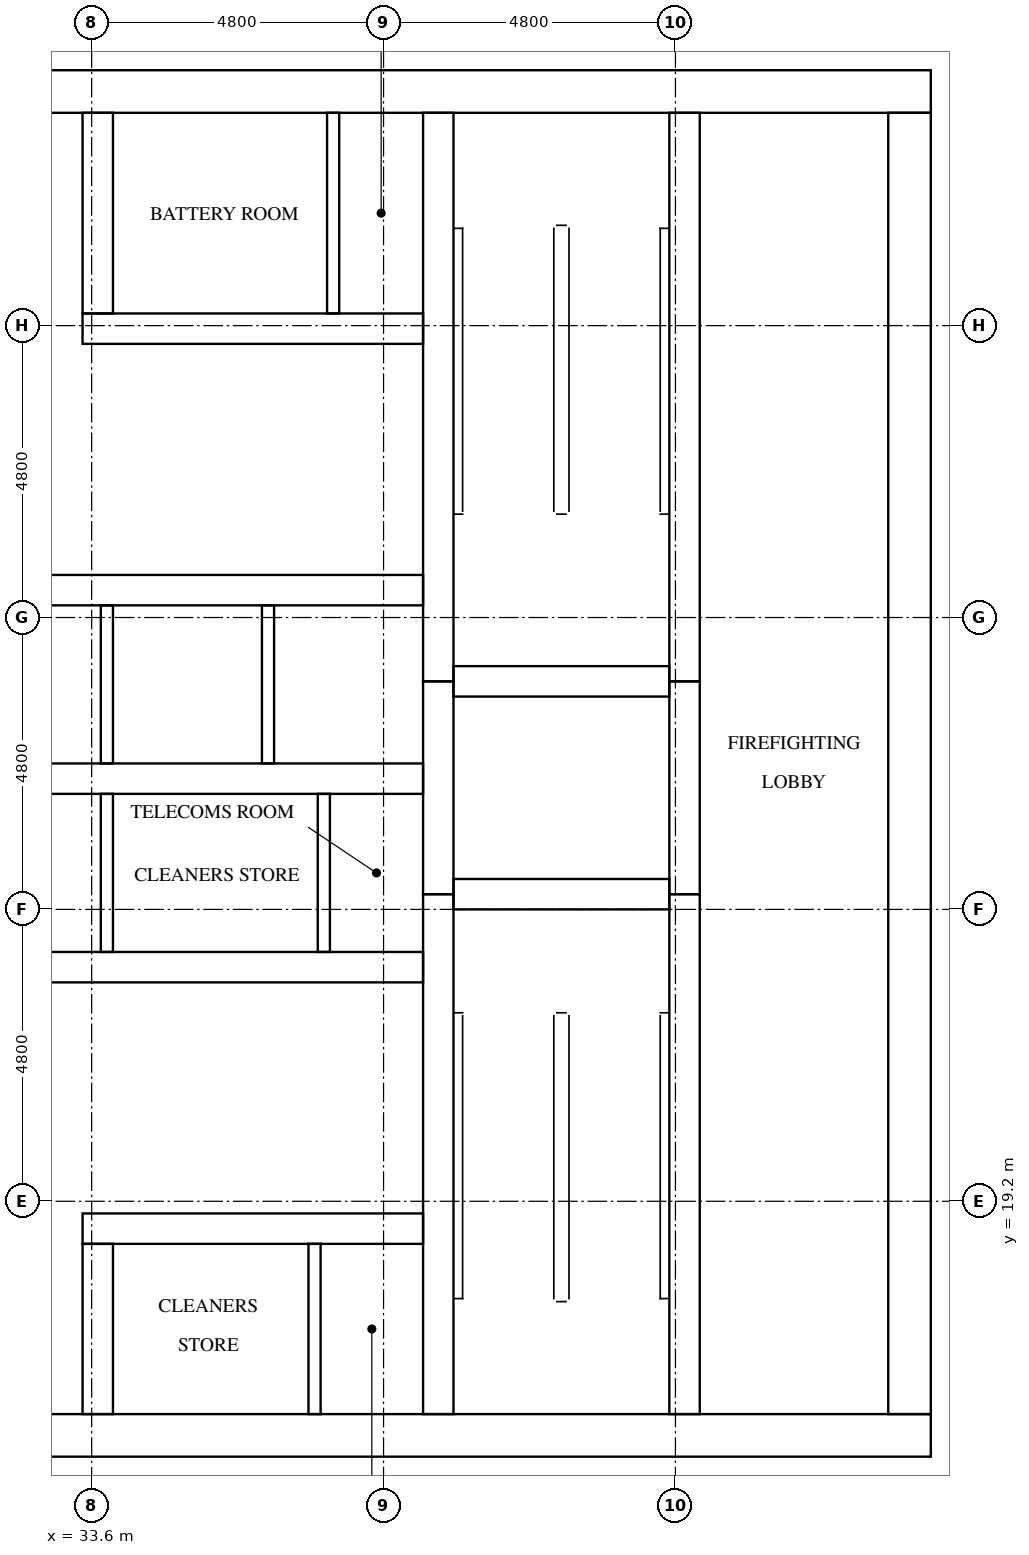
"""IFC4 building model, lengths in metres.
Left out: names, types, materials, properties, quantities, classifications, styles, units other than length and angle.
Written with IfcOpenShell. Run it as: python <this file> out.ifc"""

import sys

from ifc_helpers import new_model, si_unit, direction, frame, frame_2d, origin, place, context, subcontext, project, spatial, rectangle, extrude, element, fill, save


model = new_model("IFC4")
c1 = context("Model", 3, precision=1e-05, world=origin(), true_north=direction((0.0, 1.0)))
c2 = subcontext(c1, "Body", "Model", "MODEL_VIEW")
j1 = project(units=[si_unit("LENGTHUNIT", "METRE"), si_unit("PLANEANGLEUNIT", "RADIAN")], contexts=[c1])
p1 = place(None, origin())
s1 = spatial("IfcSite", under=j1, at=p1, CompositionType="ELEMENT")
p2 = place(p1, origin())
s2 = spatial("IfcBuilding", under=s1, at=p2, CompositionType="ELEMENT")
p3 = place(p2, frame((0.0, 0.0, 203.4)))
s3 = spatial("IfcBuildingStorey", under=s2, at=p3, CompositionType="ELEMENT", Elevation=203.4)
p4 = place(p3, frame((15.0, 15.35, 0.0), z_axis=(0.0, 0.0, 1.0), x_axis=(1.0, 0.0, 0.0)))
e1 = element("IfcWall", 1, at=p4, inside=s3, PredefinedType="SHEAR", context=c2, shape_type="SweptSolid", body=[
    extrude(rectangle(XDim=32.4, YDim=0.7, at=frame_2d((16.2, 0.0))), origin(), (0.0, 0.0, 1.0), 5.1),
])
p5 = place(p4, frame((15.3, 0.0, 0.0)))
e2 = element("IfcOpeningElement", 2, at=p5, cuts=e1, PredefinedType="OPENING", context=c2, shape_type="SweptSolid", body=[
    extrude(rectangle(XDim=1.8, YDim=2.1, at=frame_2d((0.9, 1.05))), frame((0.0, 0.36, 0.0), z_axis=(0.0, -1.0, 0.0), x_axis=(1.0, 0.0, 0.0)), (0.0, 0.0, 1.0), 0.72),
])
p6 = place(p3, frame((15.0, 37.45, 0.0), z_axis=(0.0, 0.0, 1.0), x_axis=(1.0, 0.0, 0.0)))
e3 = element("IfcWall", 3, at=p6, inside=s3, PredefinedType="SHEAR", context=c2, shape_type="SweptSolid", body=[
    extrude(rectangle(XDim=32.4, YDim=0.7, at=frame_2d((16.2, 0.0))), origin(), (0.0, 0.0, 1.0), 5.1),
])
p7 = place(p6, frame((15.3, 0.0, 0.0)))
e4 = element("IfcOpeningElement", 4, at=p7, cuts=e3, PredefinedType="OPENING", context=c2, shape_type="SweptSolid", body=[
    extrude(rectangle(XDim=1.8, YDim=2.1, at=frame_2d((0.9, 1.05))), frame((0.0, 0.36, 0.0), z_axis=(0.0, -1.0, 0.0), x_axis=(1.0, 0.0, 0.0)), (0.0, 0.0, 1.0), 0.72),
])
p8 = place(p6, frame((1.544, 0.0, 0.0)))
e5 = element("IfcOpeningElement", 5, at=p8, cuts=e3, PredefinedType="OPENING", context=c2, shape_type="SweptSolid", body=[
    extrude(rectangle(XDim=1.0, YDim=2.1, at=frame_2d((0.5, 1.05))), frame((0.0, 0.36, 0.0), z_axis=(0.0, -1.0, 0.0), x_axis=(1.0, 0.0, 0.0)), (0.0, 0.0, 1.0), 0.72),
])
p9 = place(p6, frame((5.219, 0.0, 0.0)))
e6 = element("IfcOpeningElement", 6, at=p9, cuts=e3, PredefinedType="OPENING", context=c2, shape_type="SweptSolid", body=[
    extrude(rectangle(XDim=1.0, YDim=2.1, at=frame_2d((0.5, 1.05))), frame((0.0, 0.36, 0.0), z_axis=(0.0, -1.0, 0.0), x_axis=(1.0, 0.0, 0.0)), (0.0, 0.0, 1.0), 0.72),
])
p10 = place(p3, frame((47.05, 15.7, 0.0), z_axis=(0.0, 0.0, 1.0), x_axis=(0.0, 1.0, 0.0)))
e7 = element("IfcWall", 7, at=p10, inside=s3, PredefinedType="SHEAR", context=c2, shape_type="SweptSolid", body=[
    extrude(rectangle(XDim=21.4, YDim=0.7, at=frame_2d((10.7, 0.0))), origin(), (0.0, 0.0, 1.0), 5.1),
])
p11 = place(p10, frame((10.4, 0.0, 0.0)))
e8 = element("IfcOpeningElement", 8, at=p11, cuts=e7, PredefinedType="OPENING", context=c2, shape_type="SweptSolid", body=[
    extrude(rectangle(XDim=1.2, YDim=2.1, at=frame_2d((0.6, 1.05))), frame((0.0, 0.36, 0.0), z_axis=(0.0, -1.0, 0.0), x_axis=(1.0, 0.0, 0.0)), (0.0, 0.0, 1.0), 0.72),
])
p12 = place(p3, frame((39.3, 15.7, 0.0), z_axis=(0.0, 0.0, 1.0), x_axis=(0.0, 1.0, 0.0)))
e9 = element("IfcWall", 9, at=p12, inside=s3, PredefinedType="SHEAR", context=c2, shape_type="SweptSolid", body=[
    extrude(rectangle(XDim=8.55, YDim=0.5, at=frame_2d((4.275, 0.0))), origin(), (0.0, 0.0, 1.0), 5.1),
])
p13 = place(p3, frame((39.3, 24.25, 0.0), z_axis=(0.0, 0.0, 1.0), x_axis=(0.0, 1.0, 0.0)))
e10 = element("IfcWall", 10, at=p13, inside=s3, PredefinedType="SHEAR", context=c2, shape_type="SweptSolid", body=[
    extrude(rectangle(XDim=3.5, YDim=0.5, at=frame_2d((1.75, 0.0))), origin(), (0.0, 0.0, 1.0), 5.1),
])
p14 = place(p3, frame((39.3, 27.75, 0.0), z_axis=(0.0, 0.0, 1.0), x_axis=(0.0, 1.0, 0.0)))
e11 = element("IfcWall", 11, at=p14, inside=s3, PredefinedType="SHEAR", context=c2, shape_type="SweptSolid", body=[
    extrude(rectangle(XDim=9.35, YDim=0.5, at=frame_2d((4.675, 0.0))), origin(), (0.0, 0.0, 1.0), 5.1),
])
p15 = place(p3, frame((43.35, 15.7, 0.0), z_axis=(0.0, 0.0, 1.0), x_axis=(0.0, 1.0, 0.0)))
e12 = element("IfcWall", 12, at=p15, inside=s3, PredefinedType="SHEAR", context=c2, shape_type="SweptSolid", body=[
    extrude(rectangle(XDim=8.55, YDim=0.5, at=frame_2d((4.275, 0.0))), origin(), (0.0, 0.0, 1.0), 5.1),
])
p16 = place(p15, frame((0.5, 0.0, 0.0)))
e13 = element("IfcOpeningElement", 13, at=p16, cuts=e12, PredefinedType="OPENING", context=c2, shape_type="SweptSolid", body=[
    extrude(rectangle(XDim=1.2, YDim=2.1, at=frame_2d((0.6, 1.05))), frame((0.0, 0.26, 0.0), z_axis=(0.0, -1.0, 0.0), x_axis=(1.0, 0.0, 0.0)), (0.0, 0.0, 1.0), 0.52),
])
p17 = place(p3, frame((43.35, 24.25, 0.0), z_axis=(0.0, 0.0, 1.0), x_axis=(0.0, 1.0, 0.0)))
e14 = element("IfcWall", 14, at=p17, inside=s3, PredefinedType="SHEAR", context=c2, shape_type="SweptSolid", body=[
    extrude(rectangle(XDim=3.5, YDim=0.5, at=frame_2d((1.75, 0.0))), origin(), (0.0, 0.0, 1.0), 5.1),
])
p18 = place(p17, frame((1.2, 0.0, 0.0)))
e15 = element("IfcOpeningElement", 15, at=p18, cuts=e14, PredefinedType="OPENING", context=c2, shape_type="SweptSolid", body=[
    extrude(rectangle(XDim=1.1, YDim=2.1, at=frame_2d((0.55, 1.05))), frame((0.0, 0.26, 0.0), z_axis=(0.0, -1.0, 0.0), x_axis=(1.0, 0.0, 0.0)), (0.0, 0.0, 1.0), 0.52),
])
p19 = place(p3, frame((43.35, 27.75, 0.0), z_axis=(0.0, 0.0, 1.0), x_axis=(0.0, 1.0, 0.0)))
e16 = element("IfcWall", 16, at=p19, inside=s3, PredefinedType="SHEAR", context=c2, shape_type="SweptSolid", body=[
    extrude(rectangle(XDim=9.35, YDim=0.5, at=frame_2d((4.675, 0.0))), origin(), (0.0, 0.0, 1.0), 5.1),
])
p20 = place(p19, frame((7.65, 0.0, 0.0)))
e17 = element("IfcOpeningElement", 17, at=p20, cuts=e16, PredefinedType="OPENING", context=c2, shape_type="SweptSolid", body=[
    extrude(rectangle(XDim=1.2, YDim=2.1, at=frame_2d((0.6, 1.05))), frame((0.0, 0.26, 0.0), z_axis=(0.0, -1.0, 0.0), x_axis=(1.0, 0.0, 0.0)), (0.0, 0.0, 1.0), 0.52),
])
for number, where, z_axis, x_axis in (
    (18, (39.55, 24.25, 0.0), (0.0, 0.0, 1.0), (1.0, 0.0, 0.0)),
    (19, (39.55, 27.75, 0.0), (0.0, 0.0, 1.0), (1.0, 0.0, 0.0)),
):
    element("IfcWall", number, at=place(p3, frame(where, z_axis=z_axis, x_axis=x_axis)), inside=s3, PredefinedType="SHEAR", context=c2, shape_type="SweptSolid", body=[
        extrude(rectangle(XDim=3.55, YDim=0.5, at=frame_2d((1.775, 0.0))), origin(), (0.0, 0.0, 1.0), 5.1),
    ])
p21 = place(p3, frame((33.45, 18.75, 0.0), z_axis=(0.0, 0.0, 1.0), x_axis=(1.0, 0.0, 0.0)))
e20 = element("IfcWall", 20, at=p21, inside=s3, PredefinedType="SHEAR", context=c2, shape_type="SweptSolid", body=[
    extrude(rectangle(XDim=5.6, YDim=0.5, at=frame_2d((2.8, 0.0))), origin(), (0.0, 0.0, 1.0), 5.1),
])
p22 = place(p21, frame((1.607, 0.0, 0.0)))
e21 = element("IfcOpeningElement", 21, at=p22, cuts=e20, PredefinedType="OPENING", context=c2, shape_type="SweptSolid", body=[
    extrude(rectangle(XDim=1.0, YDim=2.1, at=frame_2d((0.5, 1.05))), frame((0.0, 0.26, 0.0), z_axis=(0.0, -1.0, 0.0), x_axis=(1.0, 0.0, 0.0)), (0.0, 0.0, 1.0), 0.52),
])
p23 = place(p21, frame((4.258, 0.0, 0.0)))
e22 = element("IfcOpeningElement", 22, at=p23, cuts=e20, PredefinedType="OPENING", context=c2, shape_type="SweptSolid", body=[
    extrude(rectangle(XDim=1.0, YDim=2.1, at=frame_2d((0.5, 1.05))), frame((0.0, 0.26, 0.0), z_axis=(0.0, -1.0, 0.0), x_axis=(1.0, 0.0, 0.0)), (0.0, 0.0, 1.0), 0.52),
])
p24 = place(p3, frame((23.35, 23.05, 0.0), z_axis=(0.0, 0.0, 1.0), x_axis=(1.0, 0.0, 0.0)))
e23 = element("IfcWall", 23, at=p24, inside=s3, PredefinedType="SHEAR", context=c2, shape_type="SweptSolid", body=[
    extrude(rectangle(XDim=15.7, YDim=0.5, at=frame_2d((7.85, 0.0))), origin(), (0.0, 0.0, 1.0), 5.1),
])
p25 = place(p24, frame((2.05, 0.0, 0.0)))
e24 = element("IfcOpeningElement", 24, at=p25, cuts=e23, PredefinedType="OPENING", context=c2, shape_type="SweptSolid", body=[
    extrude(rectangle(XDim=1.0, YDim=2.1, at=frame_2d((0.5, 1.05))), frame((0.0, 0.26, 0.0), z_axis=(0.0, -1.0, 0.0), x_axis=(1.0, 0.0, 0.0)), (0.0, 0.0, 1.0), 0.52),
])
p26 = place(p24, frame((11.784, 0.0, 0.0)))
e25 = element("IfcOpeningElement", 25, at=p26, cuts=e23, PredefinedType="OPENING", context=c2, shape_type="SweptSolid", body=[
    extrude(rectangle(XDim=1.0, YDim=2.1, at=frame_2d((0.5, 1.05))), frame((0.0, 0.26, 0.0), z_axis=(0.0, -1.0, 0.0), x_axis=(1.0, 0.0, 0.0)), (0.0, 0.0, 1.0), 0.52),
])
p27 = place(p24, frame((14.434, 0.0, 0.0)))
e26 = element("IfcOpeningElement", 26, at=p27, cuts=e23, PredefinedType="OPENING", context=c2, shape_type="SweptSolid", body=[
    extrude(rectangle(XDim=1.0, YDim=2.1, at=frame_2d((0.5, 1.05))), frame((0.0, 0.26, 0.0), z_axis=(0.0, -1.0, 0.0), x_axis=(1.0, 0.0, 0.0)), (0.0, 0.0, 1.0), 0.52),
])
p28 = place(p3, frame((23.35, 26.15, 0.0), z_axis=(0.0, 0.0, 1.0), x_axis=(1.0, 0.0, 0.0)))
e27 = element("IfcWall", 27, at=p28, inside=s3, PredefinedType="SHEAR", context=c2, shape_type="SweptSolid", body=[
    extrude(rectangle(XDim=15.7, YDim=0.5, at=frame_2d((7.85, 0.0))), origin(), (0.0, 0.0, 1.0), 5.1),
])
p29 = place(p3, frame((23.35, 29.25, 0.0), z_axis=(0.0, 0.0, 1.0), x_axis=(1.0, 0.0, 0.0)))
e28 = element("IfcWall", 28, at=p29, inside=s3, PredefinedType="SHEAR", context=c2, shape_type="SweptSolid", body=[
    extrude(rectangle(XDim=15.7, YDim=0.5, at=frame_2d((7.85, 0.0))), origin(), (0.0, 0.0, 1.0), 5.1),
])
p30 = place(p29, frame((0.675, 0.0, 0.0)))
e29 = element("IfcOpeningElement", 29, at=p30, cuts=e28, PredefinedType="OPENING", context=c2, shape_type="SweptSolid", body=[
    extrude(rectangle(XDim=1.1, YDim=2.1, at=frame_2d((0.55, 1.05))), frame((0.0, 0.26, 0.0), z_axis=(0.0, -1.0, 0.0), x_axis=(1.0, 0.0, 0.0)), (0.0, 0.0, 1.0), 0.52),
])
p31 = place(p29, frame((3.325, 0.0, 0.0)))
e30 = element("IfcOpeningElement", 30, at=p31, cuts=e28, PredefinedType="OPENING", context=c2, shape_type="SweptSolid", body=[
    extrude(rectangle(XDim=1.1, YDim=2.1, at=frame_2d((0.55, 1.05))), frame((0.0, 0.26, 0.0), z_axis=(0.0, -1.0, 0.0), x_axis=(1.0, 0.0, 0.0)), (0.0, 0.0, 1.0), 0.52),
])
p32 = place(p29, frame((5.975, 0.0, 0.0)))
e31 = element("IfcOpeningElement", 31, at=p32, cuts=e28, PredefinedType="OPENING", context=c2, shape_type="SweptSolid", body=[
    extrude(rectangle(XDim=1.1, YDim=2.1, at=frame_2d((0.55, 1.05))), frame((0.0, 0.26, 0.0), z_axis=(0.0, -1.0, 0.0), x_axis=(1.0, 0.0, 0.0)), (0.0, 0.0, 1.0), 0.52),
])
p33 = place(p29, frame((8.625, 0.0, 0.0)))
e32 = element("IfcOpeningElement", 32, at=p33, cuts=e28, PredefinedType="OPENING", context=c2, shape_type="SweptSolid", body=[
    extrude(rectangle(XDim=1.1, YDim=2.1, at=frame_2d((0.55, 1.05))), frame((0.0, 0.26, 0.0), z_axis=(0.0, -1.0, 0.0), x_axis=(1.0, 0.0, 0.0)), (0.0, 0.0, 1.0), 0.52),
])
p34 = place(p29, frame((11.275, 0.0, 0.0)))
e33 = element("IfcOpeningElement", 33, at=p34, cuts=e28, PredefinedType="OPENING", context=c2, shape_type="SweptSolid", body=[
    extrude(rectangle(XDim=1.1, YDim=2.1, at=frame_2d((0.55, 1.05))), frame((0.0, 0.26, 0.0), z_axis=(0.0, -1.0, 0.0), x_axis=(1.0, 0.0, 0.0)), (0.0, 0.0, 1.0), 0.52),
])
p35 = place(p29, frame((13.925, 0.0, 0.0)))
e34 = element("IfcOpeningElement", 34, at=p35, cuts=e28, PredefinedType="OPENING", context=c2, shape_type="SweptSolid", body=[
    extrude(rectangle(XDim=1.1, YDim=2.1, at=frame_2d((0.55, 1.05))), frame((0.0, 0.26, 0.0), z_axis=(0.0, -1.0, 0.0), x_axis=(1.0, 0.0, 0.0)), (0.0, 0.0, 1.0), 0.52),
])
p36 = place(p3, frame((33.45, 33.55, 0.0), z_axis=(0.0, 0.0, 1.0), x_axis=(1.0, 0.0, 0.0)))
e35 = element("IfcWall", 35, at=p36, inside=s3, PredefinedType="SHEAR", context=c2, shape_type="SweptSolid", body=[
    extrude(rectangle(XDim=5.6, YDim=0.5, at=frame_2d((2.8, 0.0))), origin(), (0.0, 0.0, 1.0), 5.1),
])
p37 = place(p36, frame((1.76, 0.0, 0.0)))
e36 = element("IfcOpeningElement", 36, at=p37, cuts=e35, PredefinedType="OPENING", context=c2, shape_type="SweptSolid", body=[
    extrude(rectangle(XDim=1.0, YDim=2.1, at=frame_2d((0.5, 1.05))), frame((0.0, 0.26, 0.0), z_axis=(0.0, -1.0, 0.0), x_axis=(1.0, 0.0, 0.0)), (0.0, 0.0, 1.0), 0.52),
])
p38 = place(p36, frame((4.41, 0.0, 0.0)))
e37 = element("IfcOpeningElement", 37, at=p38, cuts=e35, PredefinedType="OPENING", context=c2, shape_type="SweptSolid", body=[
    extrude(rectangle(XDim=1.0, YDim=2.1, at=frame_2d((0.5, 1.05))), frame((0.0, 0.26, 0.0), z_axis=(0.0, -1.0, 0.0), x_axis=(1.0, 0.0, 0.0)), (0.0, 0.0, 1.0), 0.52),
])
p39 = place(p3, frame((33.7, 15.7, 0.0), z_axis=(0.0, 0.0, 1.0), x_axis=(0.0, 1.0, 0.0)))
e38 = element("IfcWall", 38, at=p39, inside=s3, PredefinedType="SHEAR", context=c2, shape_type="SweptSolid", body=[
    extrude(rectangle(XDim=2.8, YDim=0.5, at=frame_2d((1.4, 0.0))), origin(), (0.0, 0.0, 1.0), 5.1),
])
p40 = place(p3, frame((33.7, 33.8, 0.0), z_axis=(0.0, 0.0, 1.0), x_axis=(0.0, 1.0, 0.0)))
e39 = element("IfcWall", 39, at=p40, inside=s3, PredefinedType="SHEAR", context=c2, shape_type="SweptSolid", body=[
    extrude(rectangle(XDim=3.3, YDim=0.5, at=frame_2d((1.65, 0.0))), origin(), (0.0, 0.0, 1.0), 5.1),
])
p41 = place(p3, frame((33.85, 23.3, 0.0), z_axis=(0.0, 0.0, 1.0), x_axis=(0.0, 1.0, 0.0)))
e40 = element("IfcWall", 40, at=p41, inside=s3, PredefinedType="SOLIDWALL", context=c2, shape_type="SweptSolid", body=[
    extrude(rectangle(XDim=2.6, YDim=0.2, at=frame_2d((1.3, 0.0))), origin(), (0.0, 0.0, 1.0), 5.1),
])
for number, where, z_axis, x_axis in (
    (41, (33.85, 26.4, 0.0), (0.0, 0.0, 1.0), (0.0, 1.0, 0.0)),
    (42, (36.5, 26.4, 0.0), (0.0, 0.0, 1.0), (0.0, 1.0, 0.0)),
):
    element("IfcWall", number, at=place(p3, frame(where, z_axis=z_axis, x_axis=x_axis)), inside=s3, PredefinedType="SOLIDWALL", context=c2, shape_type="SweptSolid", body=[
        extrude(rectangle(XDim=2.6, YDim=0.2, at=frame_2d((1.3, 0.0))), origin(), (0.0, 0.0, 1.0), 5.1),
    ])
p42 = place(p3, frame((37.418, 23.3, 0.0), z_axis=(0.0, 0.0, 1.0), x_axis=(0.0, 1.0, 0.0)))
e43 = element("IfcWall", 43, at=p42, inside=s3, PredefinedType="PARTITIONING", context=c2, shape_type="SweptSolid", body=[
    extrude(rectangle(XDim=2.6, YDim=0.2, at=frame_2d((1.3, 0.0))), origin(), (0.0, 0.0, 1.0), 5.1),
])
p43 = place(p3, frame((37.265, 15.7, 0.0), z_axis=(0.0, 0.0, 1.0), x_axis=(0.0, 1.0, 0.0)))
e44 = element("IfcWall", 44, at=p43, inside=s3, PredefinedType="PARTITIONING", context=c2, shape_type="SweptSolid", body=[
    extrude(rectangle(XDim=2.8, YDim=0.2, at=frame_2d((1.4, 0.0))), origin(), (0.0, 0.0, 1.0), 5.1),
])
p44 = place(p3, frame((37.571, 33.8, 0.0), z_axis=(0.0, 0.0, 1.0), x_axis=(0.0, 1.0, 0.0)))
e45 = element("IfcWall", 45, at=p44, inside=s3, PredefinedType="PARTITIONING", context=c2, shape_type="SweptSolid", body=[
    extrude(rectangle(XDim=3.3, YDim=0.2, at=frame_2d((1.65, 0.0))), origin(), (0.0, 0.0, 1.0), 5.1),
])
p45 = place(p33, origin())
e46 = element("IfcDoor", 46, at=p45, inside=s3, OperationType="DOUBLE_DOOR_SLIDING", PredefinedType="DOOR", context=c2, shape_type="SweptSolid", body=[
    extrude(rectangle(XDim=1.1, YDim=2.1, at=frame_2d((0.55, 1.05))), frame((0.0, 0.025, 0.0), z_axis=(0.0, -1.0, 0.0), x_axis=(1.0, 0.0, 0.0)), (0.0, 0.0, 1.0), 0.05),
])
fill(e32, e46)
p46 = place(p34, origin())
e47 = element("IfcDoor", 47, at=p46, inside=s3, OperationType="DOUBLE_DOOR_SLIDING", PredefinedType="DOOR", context=c2, shape_type="SweptSolid", body=[
    extrude(rectangle(XDim=1.1, YDim=2.1, at=frame_2d((0.55, 1.05))), frame((0.0, 0.025, 0.0), z_axis=(0.0, -1.0, 0.0), x_axis=(1.0, 0.0, 0.0)), (0.0, 0.0, 1.0), 0.05),
])
fill(e33, e47)
p47 = place(p35, origin())
e48 = element("IfcDoor", 48, at=p47, inside=s3, OperationType="DOUBLE_DOOR_SLIDING", PredefinedType="DOOR", context=c2, shape_type="SweptSolid", body=[
    extrude(rectangle(XDim=1.1, YDim=2.1, at=frame_2d((0.55, 1.05))), frame((0.0, 0.025, 0.0), z_axis=(0.0, -1.0, 0.0), x_axis=(1.0, 0.0, 0.0)), (0.0, 0.0, 1.0), 0.05),
])
fill(e34, e48)
p48 = place(p18, origin())
e49 = element("IfcDoor", 49, at=p48, inside=s3, OperationType="DOUBLE_DOOR_SLIDING", PredefinedType="DOOR", context=c2, shape_type="SweptSolid", body=[
    extrude(rectangle(XDim=1.1, YDim=2.1, at=frame_2d((0.55, 1.05))), frame((0.0, 0.025, 0.0), z_axis=(0.0, -1.0, 0.0), x_axis=(1.0, 0.0, 0.0)), (0.0, 0.0, 1.0), 0.05),
])
fill(e15, e49)
p49 = place(p16, origin())
e50 = element("IfcDoor", 50, at=p49, inside=s3, OperationType="SINGLE_SWING_RIGHT", PredefinedType="DOOR", context=c2, shape_type="SweptSolid", body=[
    extrude(rectangle(XDim=1.2, YDim=2.1, at=frame_2d((0.6, 1.05))), frame((0.0, 0.025, 0.0), z_axis=(0.0, -1.0, 0.0), x_axis=(1.0, 0.0, 0.0)), (0.0, 0.0, 1.0), 0.05),
])
fill(e13, e50)
p50 = place(p20, origin())
e51 = element("IfcDoor", 51, at=p50, inside=s3, OperationType="SINGLE_SWING_LEFT", PredefinedType="DOOR", context=c2, shape_type="SweptSolid", body=[
    extrude(rectangle(XDim=1.2, YDim=2.1, at=frame_2d((0.6, 1.05))), frame((0.0, 0.025, 0.0), z_axis=(0.0, -1.0, 0.0), x_axis=(1.0, 0.0, 0.0)), (0.0, 0.0, 1.0), 0.05),
])
fill(e17, e51)
p51 = place(p11, origin())
e52 = element("IfcDoor", 52, at=p51, inside=s3, OperationType="SINGLE_SWING_LEFT", PredefinedType="DOOR", context=c2, shape_type="SweptSolid", body=[
    extrude(rectangle(XDim=1.2, YDim=2.1, at=frame_2d((0.6, 1.05))), frame((0.0, 0.025, 0.0), z_axis=(0.0, -1.0, 0.0), x_axis=(1.0, 0.0, 0.0)), (0.0, 0.0, 1.0), 0.05),
])
fill(e8, e52)
p52 = place(p26, frame((1.0, 0.0, 0.0), z_axis=(0.0, 0.0, 1.0), x_axis=(-1.0, 0.0, 0.0)))
e53 = element("IfcDoor", 53, at=p52, inside=s3, OperationType="SINGLE_SWING_LEFT", PredefinedType="DOOR", context=c2, shape_type="SweptSolid", body=[
    extrude(rectangle(XDim=1.0, YDim=2.1, at=frame_2d((0.5, 1.05))), frame((0.0, 0.025, 0.0), z_axis=(0.0, -1.0, 0.0), x_axis=(1.0, 0.0, 0.0)), (0.0, 0.0, 1.0), 0.05),
])
fill(e25, e53)
p53 = place(p27, frame((1.0, 0.0, 0.0), z_axis=(0.0, 0.0, 1.0), x_axis=(-1.0, 0.0, 0.0)))
e54 = element("IfcDoor", 54, at=p53, inside=s3, OperationType="SINGLE_SWING_RIGHT", PredefinedType="DOOR", context=c2, shape_type="SweptSolid", body=[
    extrude(rectangle(XDim=1.0, YDim=2.1, at=frame_2d((0.5, 1.05))), frame((0.0, 0.025, 0.0), z_axis=(0.0, -1.0, 0.0), x_axis=(1.0, 0.0, 0.0)), (0.0, 0.0, 1.0), 0.05),
])
fill(e26, e54)
p54 = place(p22, origin())
e55 = element("IfcDoor", 55, at=p54, inside=s3, OperationType="SINGLE_SWING_LEFT", PredefinedType="DOOR", context=c2, shape_type="SweptSolid", body=[
    extrude(rectangle(XDim=1.0, YDim=2.1, at=frame_2d((0.5, 1.05))), frame((0.0, 0.025, 0.0), z_axis=(0.0, -1.0, 0.0), x_axis=(1.0, 0.0, 0.0)), (0.0, 0.0, 1.0), 0.05),
])
fill(e21, e55)
p55 = place(p23, origin())
e56 = element("IfcDoor", 56, at=p55, inside=s3, OperationType="SINGLE_SWING_RIGHT", PredefinedType="DOOR", context=c2, shape_type="SweptSolid", body=[
    extrude(rectangle(XDim=1.0, YDim=2.1, at=frame_2d((0.5, 1.05))), frame((0.0, 0.025, 0.0), z_axis=(0.0, -1.0, 0.0), x_axis=(1.0, 0.0, 0.0)), (0.0, 0.0, 1.0), 0.05),
])
fill(e22, e56)
p56 = place(p37, frame((1.0, 0.0, 0.0), z_axis=(0.0, 0.0, 1.0), x_axis=(-1.0, 0.0, 0.0)))
e57 = element("IfcDoor", 57, at=p56, inside=s3, OperationType="SINGLE_SWING_LEFT", PredefinedType="DOOR", context=c2, shape_type="SweptSolid", body=[
    extrude(rectangle(XDim=1.0, YDim=2.1, at=frame_2d((0.5, 1.05))), frame((0.0, 0.025, 0.0), z_axis=(0.0, -1.0, 0.0), x_axis=(1.0, 0.0, 0.0)), (0.0, 0.0, 1.0), 0.05),
])
fill(e36, e57)
p57 = place(p38, frame((1.0, 0.0, 0.0), z_axis=(0.0, 0.0, 1.0), x_axis=(-1.0, 0.0, 0.0)))
e58 = element("IfcDoor", 58, at=p57, inside=s3, OperationType="SINGLE_SWING_RIGHT", PredefinedType="DOOR", context=c2, shape_type="SweptSolid", body=[
    extrude(rectangle(XDim=1.0, YDim=2.1, at=frame_2d((0.5, 1.05))), frame((0.0, 0.025, 0.0), z_axis=(0.0, -1.0, 0.0), x_axis=(1.0, 0.0, 0.0)), (0.0, 0.0, 1.0), 0.05),
])
fill(e37, e58)
save(model, sys.argv[1])
